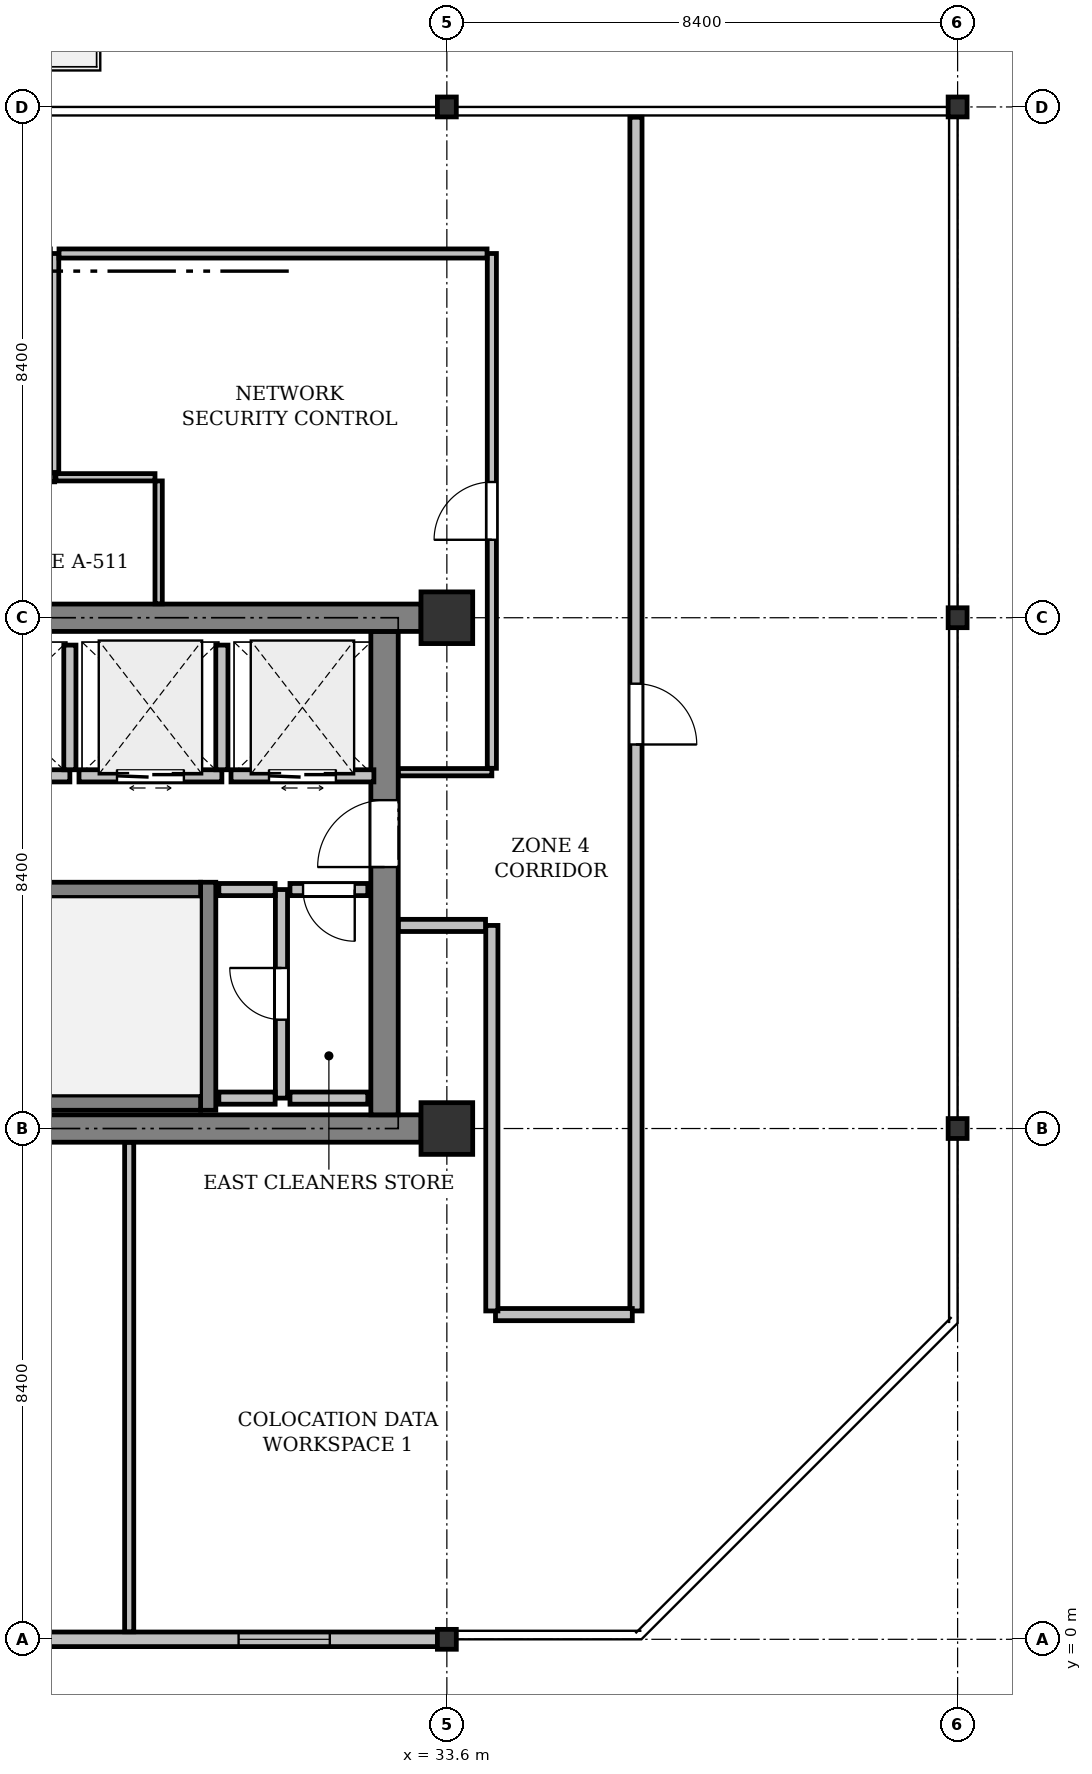
"""IFC4 building model, lengths in metres.
Left out: names, types, materials, properties, quantities, classifications, styles, units other than length and angle.
Written with IfcOpenShell. Run it as: python <this file> out.ifc"""

import sys

from ifc_helpers import new_model, si_unit, direction, frame, frame_2d, origin, origin_2d, place, context, subcontext, project, spatial, rectangle, i_section, extrude, element, fill, save


model = new_model("IFC4")
c1 = context("Model", 3, precision=1e-05, world=origin(), true_north=direction((0.0, 1.0)))
c2 = subcontext(c1, "Body", "Model", "MODEL_VIEW")
j1 = project(units=[si_unit("LENGTHUNIT", "METRE"), si_unit("PLANEANGLEUNIT", "RADIAN")], contexts=[c1])
p1 = place(None, origin())
s1 = spatial("IfcSite", under=j1, at=p1, CompositionType="ELEMENT")
p2 = place(p1, origin())
s2 = spatial("IfcBuilding", under=s1, at=p2, CompositionType="ELEMENT")
p3 = place(p2, frame((0.0, 0.0, 245.2)))
s3 = spatial("IfcBuildingStorey", under=s2, at=p3, CompositionType="ELEMENT", Elevation=245.2)
p4 = place(p3, frame((33.6, 0.0, 0.0), z_axis=(0.0, 0.0, 1.0), x_axis=(1.0, 0.0, 0.0)))
e1 = element("IfcColumn", 1, at=p4, inside=s3, PredefinedType="COLUMN", context=c2, shape_type="SweptSolid", body=[
    extrude(i_section(OverallWidth=0.35, OverallDepth=0.35, WebThickness=0.02, FlangeThickness=0.032, at=origin_2d()), origin(), (0.0, 0.0, 1.0), 5.0),
])
for number, where, z_axis, x_axis in (
    (2, (33.6, 8.4, 0.0), (0.0, 0.0, 1.0), (1.0, 0.0, 0.0)),
    (3, (33.6, 16.8, 0.0), (0.0, 0.0, 1.0), (1.0, 0.0, 0.0)),
):
    element("IfcColumn", number, at=place(p3, frame(where, z_axis=z_axis, x_axis=x_axis)), inside=s3, PredefinedType="COLUMN", context=c2, shape_type="SweptSolid", body=[
        extrude(rectangle(XDim=1.0, YDim=1.0, at=origin_2d()), origin(), (0.0, 0.0, 1.0), 5.0),
    ])
for number, where, z_axis, x_axis in (
    (4, (33.6, 25.2, 0.0), (0.0, 0.0, 1.0), (1.0, 0.0, 0.0)),
    (5, (42.0, 8.4, 0.0), (0.0, 0.0, 1.0), (1.0, 0.0, 0.0)),
    (6, (42.0, 16.8, 0.0), (0.0, 0.0, 1.0), (1.0, 0.0, 0.0)),
    (7, (42.0, 25.2, 0.0), (0.0, 0.0, 1.0), (1.0, 0.0, 0.0)),
):
    element("IfcColumn", number, at=place(p3, frame(where, z_axis=z_axis, x_axis=x_axis)), inside=s3, PredefinedType="COLUMN", context=c2, shape_type="SweptSolid", body=[
        extrude(i_section(OverallWidth=0.35, OverallDepth=0.35, WebThickness=0.02, FlangeThickness=0.032, at=origin_2d()), origin(), (0.0, 0.0, 1.0), 5.0),
    ])
p5 = place(p3, frame((42.053, 5.253, 0.0), z_axis=(0.0, 0.0, 1.0), x_axis=(-0.707106781187, -0.707106781187, 0.0)))
e8 = element("IfcWall", 8, at=p5, inside=s3, PredefinedType="STANDARD", context=c2, shape_type="SweptSolid", body=[
    extrude(rectangle(XDim=7.503, YDim=0.24, at=frame_2d((3.751, 0.0))), origin(), (0.0, 0.0, 1.0), 4.725),
])
p6 = place(p3, frame((36.875, 0.0, 0.0), z_axis=(0.0, 0.0, 1.0), x_axis=(-1.0, 0.0, 0.0)))
e9 = element("IfcWall", 9, at=p6, inside=s3, PredefinedType="STANDARD", context=c2, shape_type="SweptSolid", body=[
    extrude(rectangle(XDim=3.1, YDim=0.24, at=frame_2d((1.55, 0.0))), origin(), (0.0, 0.0, 1.0), 4.725),
])
for number, where, z_axis, x_axis in (
    (10, (33.425, 0.0, 0.0), (0.0, 0.0, 1.0), (-1.0, 0.0, 0.0)),
    (11, (25.375, 25.2, 0.0), (0.0, 0.0, 1.0), (1.0, 0.0, 0.0)),
    (12, (33.775, 25.2, 0.0), (0.0, 0.0, 1.0), (1.0, 0.0, 0.0)),
):
    element("IfcWall", number, at=place(p3, frame(where, z_axis=z_axis, x_axis=x_axis)), inside=s3, PredefinedType="STANDARD", context=c2, shape_type="SweptSolid", body=[
        extrude(rectangle(XDim=8.05, YDim=0.24, at=frame_2d((4.025, 0.0))), origin(), (0.0, 0.0, 1.0), 4.425),
    ])
p7 = place(p3, frame((42.0, 25.025, 0.0), z_axis=(0.0, 0.0, 1.0), x_axis=(0.0, -1.0, 0.0)))
e13 = element("IfcWall", 13, at=p7, inside=s3, PredefinedType="STANDARD", context=c2, shape_type="SweptSolid", body=[
    extrude(rectangle(XDim=8.05, YDim=0.24, at=frame_2d((4.025, 0.0))), origin(), (0.0, 0.0, 1.0), 4.425),
])
p8 = place(p3, frame((42.0, 16.625, 0.0), z_axis=(0.0, 0.0, 1.0), x_axis=(0.0, -1.0, 0.0)))
e14 = element("IfcWall", 14, at=p8, inside=s3, PredefinedType="STANDARD", context=c2, shape_type="SweptSolid", body=[
    extrude(rectangle(XDim=8.05, YDim=0.24, at=frame_2d((4.025, 0.0))), origin(), (0.0, 0.0, 1.0), 4.425),
])
p9 = place(p3, frame((42.0, 8.225, 0.0), z_axis=(0.0, 0.0, 1.0), x_axis=(0.0, -1.0, 0.0)))
e15 = element("IfcWall", 15, at=p9, inside=s3, PredefinedType="STANDARD", context=c2, shape_type="SweptSolid", body=[
    extrude(rectangle(XDim=3.1, YDim=0.24, at=frame_2d((1.55, 0.0))), origin(), (0.0, 0.0, 1.0), 4.725),
])
p10 = place(p3, frame((25.7, 8.4, 0.0), z_axis=(0.0, 0.0, 1.0), x_axis=(1.0, 0.0, 0.0)))
e16 = element("IfcWall", 16, at=p10, inside=s3, PredefinedType="SHEAR", context=c2, shape_type="SweptSolid", body=[
    extrude(rectangle(XDim=7.4, YDim=0.45, at=frame_2d((3.7, 0.0))), origin(), (0.0, 0.0, 1.0), 4.725),
])
p11 = place(p3, frame((32.575, 8.625, 0.0), z_axis=(0.0, 0.0, 1.0), x_axis=(0.0, 1.0, 0.0)))
e17 = element("IfcWall", 17, at=p11, inside=s3, PredefinedType="SHEAR", context=c2, shape_type="SweptSolid", body=[
    extrude(rectangle(XDim=7.95, YDim=0.45, at=frame_2d((3.975, 0.0))), origin(), (0.0, 0.0, 1.0), 4.725),
])
p12 = place(p11, frame((4.075, 0.0, 0.0)))
e18 = element("IfcOpeningElement", 18, at=p12, cuts=e17, PredefinedType="OPENING", context=c2, shape_type="SweptSolid", body=[
    extrude(rectangle(XDim=1.1, YDim=2.15, at=frame_2d((0.55, 1.075))), frame((0.0, 0.235, 0.0), z_axis=(0.0, -1.0, 0.0), x_axis=(1.0, 0.0, 0.0)), (0.0, 0.0, 1.0), 0.47),
])
p13 = place(p3, frame((25.7, 16.8, 0.0), z_axis=(0.0, 0.0, 1.0), x_axis=(1.0, 0.0, 0.0)))
e19 = element("IfcWall", 19, at=p13, inside=s3, PredefinedType="SHEAR", context=c2, shape_type="SweptSolid", body=[
    extrude(rectangle(XDim=7.4, YDim=0.45, at=frame_2d((3.7, 0.0))), origin(), (0.0, 0.0, 1.0), 4.725),
])
p14 = place(p3, frame((29.675, 8.7, 0.0), z_axis=(0.0, 0.0, 1.0), x_axis=(0.0, 1.0, 0.0)))
e20 = element("IfcWall", 20, at=p14, inside=s3, PredefinedType="SHEAR", context=c2, shape_type="SweptSolid", body=[
    extrude(rectangle(XDim=3.75, YDim=0.25, at=frame_2d((1.875, 0.0))), origin(), (0.0, 0.0, 1.0), 4.725),
])
p15 = place(p3, frame((21.8, 8.825, 0.0), z_axis=(0.0, 0.0, 1.0), x_axis=(1.0, 0.0, 0.0)))
e21 = element("IfcWall", 21, at=p15, inside=s3, PredefinedType="SHEAR", context=c2, shape_type="SweptSolid", body=[
    extrude(rectangle(XDim=7.75, YDim=0.25, at=frame_2d((3.875, 0.0))), origin(), (0.0, 0.0, 1.0), 4.725),
])
p16 = place(p3, frame((21.8, 12.325, 0.0), z_axis=(0.0, 0.0, 1.0), x_axis=(1.0, 0.0, 0.0)))
e22 = element("IfcWall", 22, at=p16, inside=s3, PredefinedType="SHEAR", context=c2, shape_type="SweptSolid", body=[
    extrude(rectangle(XDim=7.75, YDim=0.25, at=frame_2d((3.875, 0.0))), origin(), (0.0, 0.0, 1.0), 4.725),
])
p17 = place(p16, frame((0.22, 0.0, 0.0)))
e23 = element("IfcOpeningElement", 23, at=p17, cuts=e22, PredefinedType="OPENING", context=c2, shape_type="SweptSolid", body=[
    extrude(rectangle(XDim=1.1, YDim=2.15, at=frame_2d((0.55, 1.075))), frame((0.0, 0.135, 0.0), z_axis=(0.0, -1.0, 0.0), x_axis=(1.0, 0.0, 0.0)), (0.0, 0.0, 1.0), 0.27),
])
p18 = place(p3, frame((25.05, 14.2, 0.0), z_axis=(0.0, 0.0, 1.0), x_axis=(1.0, 0.0, 0.0)))
e24 = element("IfcWall", 24, at=p18, inside=s3, PredefinedType="PARTITIONING", context=c2, shape_type="SweptSolid", body=[
    extrude(rectangle(XDim=2.35, YDim=0.2, at=frame_2d((1.175, 0.0))), origin(), (0.0, 0.0, 1.0), 4.725),
])
p19 = place(p18, frame((0.625, 0.0, 0.0)))
e25 = element("IfcOpeningElement", 25, at=p19, cuts=e24, PredefinedType="OPENING", context=c2, shape_type="SweptSolid", body=[
    extrude(rectangle(XDim=1.1, YDim=2.2, at=frame_2d((0.55, 1.1))), frame((0.0, 0.11, 0.0), z_axis=(0.0, -1.0, 0.0), x_axis=(1.0, 0.0, 0.0)), (0.0, 0.0, 1.0), 0.22),
])
p20 = place(p3, frame((27.4, 14.3, 0.0), z_axis=(0.0, 0.0, 1.0), x_axis=(0.0, 1.0, 0.0)))
e26 = element("IfcWall", 26, at=p20, inside=s3, PredefinedType="PARTITIONING", context=c2, shape_type="SweptSolid", body=[
    extrude(rectangle(XDim=2.05, YDim=0.2, at=frame_2d((1.025, 0.0))), origin(), (0.0, 0.0, 1.0), 4.725),
])
p21 = place(p3, frame((27.55, 14.2, 0.0), z_axis=(0.0, 0.0, 1.0), x_axis=(1.0, 0.0, 0.0)))
e27 = element("IfcWall", 27, at=p21, inside=s3, PredefinedType="PARTITIONING", context=c2, shape_type="SweptSolid", body=[
    extrude(rectangle(XDim=2.35, YDim=0.2, at=frame_2d((1.175, 0.0))), origin(), (0.0, 0.0, 1.0), 4.725),
])
p22 = place(p21, frame((0.625, 0.0, 0.0)))
e28 = element("IfcOpeningElement", 28, at=p22, cuts=e27, PredefinedType="OPENING", context=c2, shape_type="SweptSolid", body=[
    extrude(rectangle(XDim=1.1, YDim=2.2, at=frame_2d((0.55, 1.1))), frame((0.0, 0.11, 0.0), z_axis=(0.0, -1.0, 0.0), x_axis=(1.0, 0.0, 0.0)), (0.0, 0.0, 1.0), 0.22),
])
p23 = place(p3, frame((29.9, 14.3, 0.0), z_axis=(0.0, 0.0, 1.0), x_axis=(0.0, 1.0, 0.0)))
e29 = element("IfcWall", 29, at=p23, inside=s3, PredefinedType="PARTITIONING", context=c2, shape_type="SweptSolid", body=[
    extrude(rectangle(XDim=2.05, YDim=0.2, at=frame_2d((1.025, 0.0))), origin(), (0.0, 0.0, 1.0), 4.725),
])
p24 = place(p3, frame((30.05, 14.2, 0.0), z_axis=(0.0, 0.0, 1.0), x_axis=(1.0, 0.0, 0.0)))
e30 = element("IfcWall", 30, at=p24, inside=s3, PredefinedType="PARTITIONING", context=c2, shape_type="SweptSolid", body=[
    extrude(rectangle(XDim=2.35, YDim=0.2, at=frame_2d((1.175, 0.0))), origin(), (0.0, 0.0, 1.0), 4.725),
])
p25 = place(p24, frame((0.625, 0.0, 0.0)))
e31 = element("IfcOpeningElement", 31, at=p25, cuts=e30, PredefinedType="OPENING", context=c2, shape_type="SweptSolid", body=[
    extrude(rectangle(XDim=1.1, YDim=2.2, at=frame_2d((0.55, 1.1))), frame((0.0, 0.11, 0.0), z_axis=(0.0, -1.0, 0.0), x_axis=(1.0, 0.0, 0.0)), (0.0, 0.0, 1.0), 0.22),
])
p26 = place(p3, frame((32.3, 12.33, 0.0), z_axis=(0.0, 0.0, 1.0), x_axis=(-1.0, 0.0, 0.0)))
e32 = element("IfcWall", 32, at=p26, inside=s3, PredefinedType="PARTITIONING", context=c2, shape_type="SweptSolid", body=[
    extrude(rectangle(XDim=2.45, YDim=0.2, at=frame_2d((1.225, 0.0))), origin(), (0.0, 0.0, 1.0), 4.725),
])
p27 = place(p26, frame((0.8, 0.0, 0.0)))
e33 = element("IfcOpeningElement", 33, at=p27, cuts=e32, PredefinedType="OPENING", context=c2, shape_type="SweptSolid", body=[
    extrude(rectangle(XDim=0.85, YDim=2.15, at=frame_2d((0.425, 1.075))), frame((0.0, 0.11, 0.0), z_axis=(0.0, -1.0, 0.0), x_axis=(1.0, 0.0, 0.0)), (0.0, 0.0, 1.0), 0.22),
])
p28 = place(p3, frame((29.85, 8.9, 0.0), z_axis=(0.0, 0.0, 1.0), x_axis=(1.0, 0.0, 0.0)))
e34 = element("IfcWall", 34, at=p28, inside=s3, PredefinedType="PARTITIONING", context=c2, shape_type="SweptSolid", body=[
    extrude(rectangle(XDim=2.45, YDim=0.2, at=frame_2d((1.225, 0.0))), origin(), (0.0, 0.0, 1.0), 4.725),
])
p29 = place(p3, frame((28.106, 25.076, 0.0), z_axis=(0.0, 0.0, 1.0), x_axis=(0.0, -1.0, 0.0)))
e35 = element("IfcWall", 35, at=p29, inside=s3, PredefinedType="PARTITIONING", context=c2, shape_type="SweptSolid", body=[
    extrude(rectangle(XDim=5.116, YDim=0.2, at=frame_2d((2.558, 0.0))), origin(), (0.0, 0.0, 1.0), 4.725),
])
p30 = place(p3, frame((28.21, 19.96, 0.0), z_axis=(0.0, 0.0, 1.0), x_axis=(1.0, 0.0, 0.0)))
e36 = element("IfcWall", 36, at=p30, inside=s3, PredefinedType="PARTITIONING", context=c2, shape_type="SweptSolid", body=[
    extrude(rectangle(XDim=7.39, YDim=0.2, at=frame_2d((3.695, 0.0))), origin(), (0.0, 0.0, 1.0), 3.709),
])
p31 = place(p3, frame((35.66, 19.9, 0.0), z_axis=(0.0, 0.0, 1.0), x_axis=(0.0, -1.0, 0.0)))
e37 = element("IfcWall", 37, at=p31, inside=s3, PredefinedType="PARTITIONING", context=c2, shape_type="SweptSolid", body=[
    extrude(rectangle(XDim=14.5, YDim=0.2, at=frame_2d((7.25, 0.0))), origin(), (0.0, 0.0, 1.0), 3.825),
])
p32 = place(p31, frame((6.75, 0.0, 0.0)))
e38 = element("IfcOpeningElement", 38, at=p32, cuts=e37, PredefinedType="OPENING", context=c2, shape_type="SweptSolid", body=[
    extrude(rectangle(XDim=1.0, YDim=2.15, at=frame_2d((0.5, 1.075))), frame((0.0, 0.11, 0.0), z_axis=(0.0, -1.0, 0.0), x_axis=(1.0, 0.0, 0.0)), (0.0, 0.0, 1.0), 0.22),
])
p33 = place(p3, frame((35.6, 5.34, 0.0), z_axis=(0.0, 0.0, 1.0), x_axis=(-1.0, 0.0, 0.0)))
e39 = element("IfcWall", 39, at=p33, inside=s3, PredefinedType="PARTITIONING", context=c2, shape_type="SweptSolid", body=[
    extrude(rectangle(XDim=7.494, YDim=0.2, at=frame_2d((3.747, 0.0))), origin(), (0.0, 0.0, 1.0), 3.709),
])
p34 = place(p3, frame((28.106, 5.236, 0.0), z_axis=(0.0, 0.0, 1.0), x_axis=(0.0, -1.0, 0.0)))
e40 = element("IfcWall", 40, at=p34, inside=s3, PredefinedType="PARTITIONING", context=c2, shape_type="SweptSolid", body=[
    extrude(rectangle(XDim=5.112, YDim=0.2, at=frame_2d((2.556, 0.0))), origin(), (0.0, 0.0, 1.0), 4.725),
])
p35 = place(p3, frame((20.064, 19.96, 0.0), z_axis=(0.0, 0.0, 1.0), x_axis=(1.0, 0.0, 0.0)))
e41 = element("IfcWall", 41, at=p35, inside=s3, PredefinedType="PARTITIONING", context=c2, shape_type="SweptSolid", body=[
    extrude(rectangle(XDim=7.938, YDim=0.2, at=frame_2d((3.969, 0.0))), origin(), (0.0, 0.0, 1.0), 3.709),
])
p36 = place(p3, frame((28.086, 5.34, 0.0), z_axis=(0.0, 0.0, 1.0), x_axis=(-1.0, 0.0, 0.0)))
e42 = element("IfcWall", 42, at=p36, inside=s3, PredefinedType="PARTITIONING", context=c2, shape_type="SweptSolid", body=[
    extrude(rectangle(XDim=13.67, YDim=0.2, at=frame_2d((6.835, 0.0))), origin(), (0.0, 0.0, 1.0), 3.709),
])
p37 = place(p36, frame((6.335, 0.0, 0.0)))
e43 = element("IfcOpeningElement", 43, at=p37, cuts=e42, PredefinedType="OPENING", context=c2, shape_type="SweptSolid", body=[
    extrude(rectangle(XDim=1.0, YDim=2.15, at=frame_2d((0.5, 1.075))), frame((0.0, 0.11, 0.0), z_axis=(0.0, -1.0, 0.0), x_axis=(1.0, 0.0, 0.0)), (0.0, 0.0, 1.0), 0.22),
])
p38 = place(p12, origin())
e44 = element("IfcDoor", 44, at=p38, inside=s3, OperationType="SINGLE_SWING_RIGHT", PredefinedType="DOOR", context=c2, shape_type="SweptSolid", body=[
    extrude(rectangle(XDim=1.1, YDim=2.15, at=frame_2d((0.55, 1.075))), frame((0.0, 0.025, 0.0), z_axis=(0.0, -1.0, 0.0), x_axis=(1.0, 0.0, 0.0)), (0.0, 0.0, 1.0), 0.05),
])
fill(e18, e44)
p39 = place(p22, origin())
e45 = element("IfcDoor", 45, at=p39, inside=s3, OperationType="DOUBLE_DOOR_SLIDING", PredefinedType="DOOR", context=c2, shape_type="SweptSolid", body=[
    extrude(rectangle(XDim=1.1, YDim=2.2, at=frame_2d((0.55, 1.1))), frame((0.0, 0.025, 0.0), z_axis=(0.0, -1.0, 0.0), x_axis=(1.0, 0.0, 0.0)), (0.0, 0.0, 1.0), 0.05),
])
fill(e28, e45)
p40 = place(p25, origin())
e46 = element("IfcDoor", 46, at=p40, inside=s3, OperationType="DOUBLE_DOOR_SLIDING", PredefinedType="DOOR", context=c2, shape_type="SweptSolid", body=[
    extrude(rectangle(XDim=1.1, YDim=2.2, at=frame_2d((0.55, 1.1))), frame((0.0, 0.025, 0.0), z_axis=(0.0, -1.0, 0.0), x_axis=(1.0, 0.0, 0.0)), (0.0, 0.0, 1.0), 0.05),
])
fill(e31, e46)
p41 = place(p27, origin())
e47 = element("IfcDoor", 47, at=p41, inside=s3, OperationType="SINGLE_SWING_LEFT", PredefinedType="DOOR", context=c2, shape_type="SweptSolid", body=[
    extrude(rectangle(XDim=0.85, YDim=2.15, at=frame_2d((0.425, 1.075))), frame((0.0, 0.025, 0.0), z_axis=(0.0, -1.0, 0.0), x_axis=(1.0, 0.0, 0.0)), (0.0, 0.0, 1.0), 0.05),
])
fill(e33, e47)
p42 = place(p32, origin())
e48 = element("IfcDoor", 48, at=p42, inside=s3, OperationType="SINGLE_SWING_LEFT", PredefinedType="DOOR", context=c2, shape_type="SweptSolid", body=[
    extrude(rectangle(XDim=1.0, YDim=2.15, at=frame_2d((0.5, 1.075))), frame((0.0, 0.025, 0.0), z_axis=(0.0, -1.0, 0.0), x_axis=(1.0, 0.0, 0.0)), (0.0, 0.0, 1.0), 0.05),
])
fill(e38, e48)
save(model, sys.argv[1])
